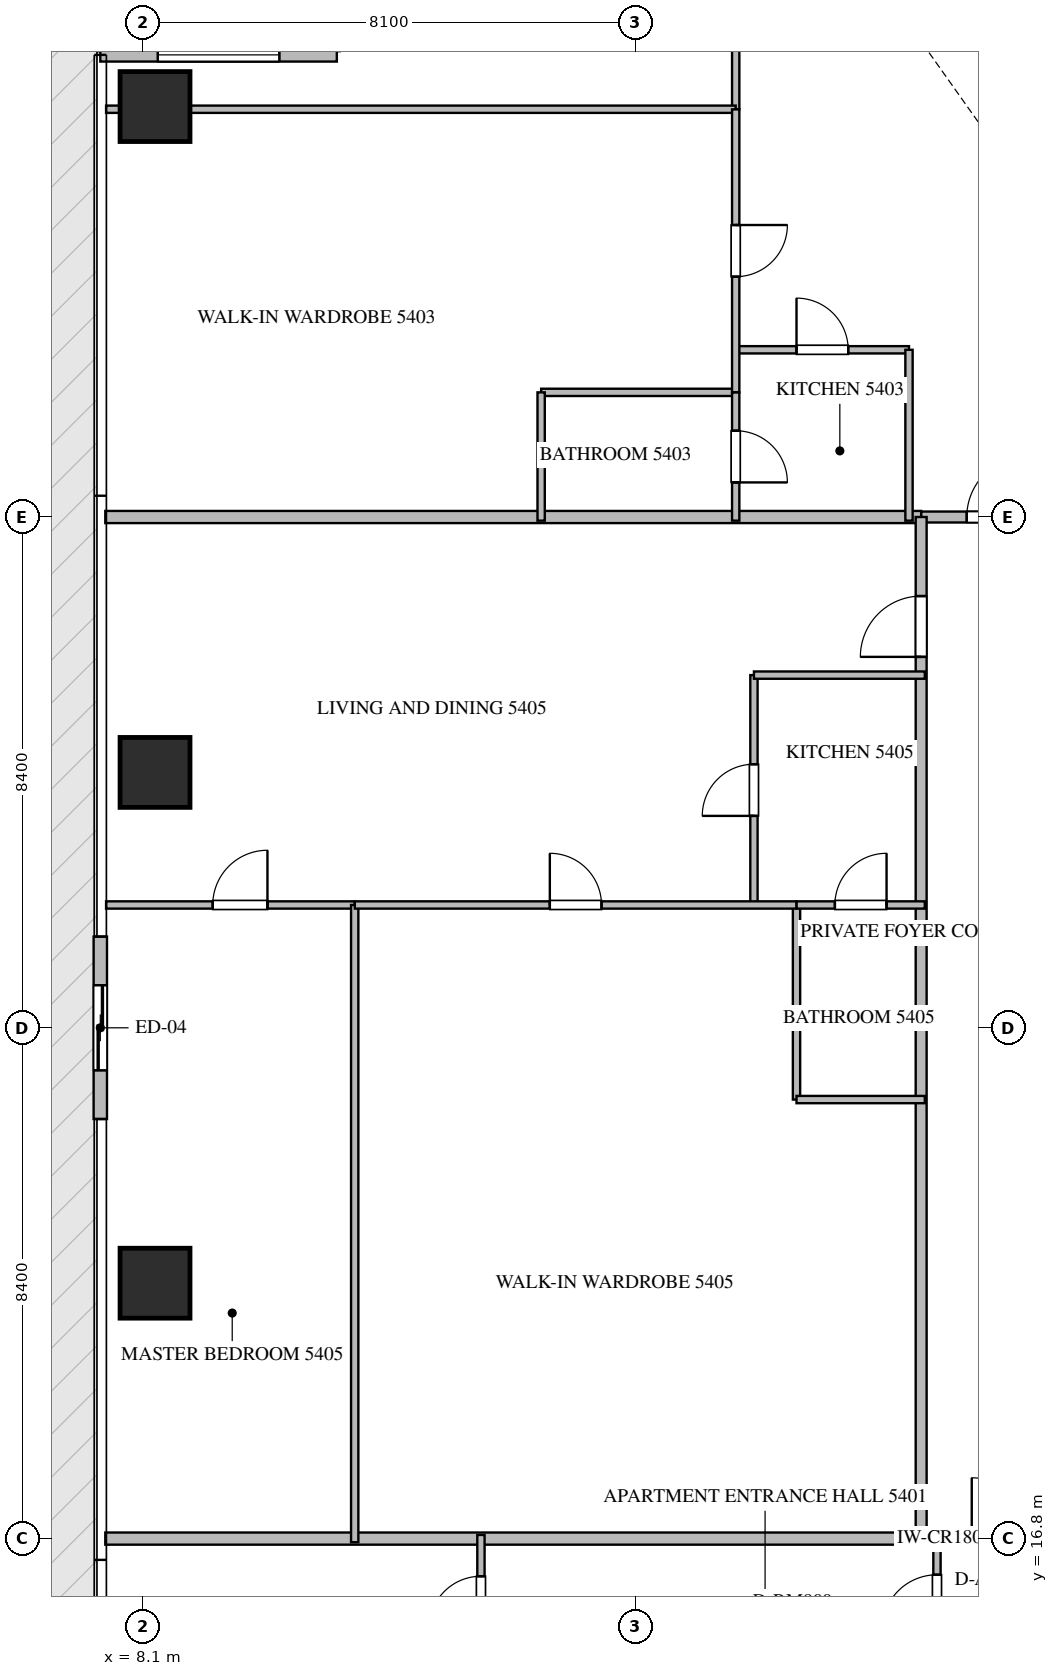
"""IFC4 building model, lengths in metres.
Left out: names, types, materials, properties, quantities, classifications, styles, units other than length and angle.
Written with IfcOpenShell. Run it as: python <this file> out.ifc"""

import sys

from ifc_helpers import new_model, si_unit, direction, frame, frame_2d, origin, origin_2d, place, context, subcontext, project, spatial, rectangle, extrude, source, transform, mapped, element, fill, save


model = new_model("IFC4")
c1 = context("Model", 3, precision=1e-05, world=origin(), true_north=direction((0.0, 1.0)))
c2 = subcontext(c1, "Body", "Model", "MODEL_VIEW")
j1 = project(units=[si_unit("LENGTHUNIT", "METRE"), si_unit("PLANEANGLEUNIT", "RADIAN")], contexts=[c1])
p1 = place(None, origin())
s1 = spatial("IfcSite", under=j1, at=p1, CompositionType="ELEMENT")
p2 = place(p1, origin())
s2 = spatial("IfcBuilding", under=s1, at=p2, CompositionType="ELEMENT")
p3 = place(p2, frame((0.0, 0.0, 218.15)))
s3 = spatial("IfcBuildingStorey", under=s2, at=p3, CompositionType="ELEMENT", Elevation=218.15)
m1 = source(origin(), c2, "Body", "SweptSolid", [
    extrude(rectangle(XDim=1.15, YDim=1.15, at=origin_2d()), origin(), (0.0, 0.0, 1.0), 3.85),
])
for number, where, z_axis, x_axis in (
    (1, (8.3, 21.0, -0.26), (0.0, 0.0, 1.0), (1.0, 0.0, 0.0)),
    (2, (8.3, 29.4, -0.26), (0.0, 0.0, 1.0), (1.0, 0.0, 0.0)),
    (3, (8.3, 40.35, -0.26), (0.0, 0.0, 1.0), (1.0, 0.0, 0.0)),
):
    element("IfcColumn", number, at=place(p3, frame(where, z_axis=z_axis, x_axis=x_axis)), inside=s3, PredefinedType="COLUMN", context=c2, shape_type="MappedRepresentation", body=[
        mapped(m1, transform((0.0, 0.0, 0.0), scale=1.0)),
    ])
p4 = place(p3, frame((11.29, 41.2, 0.0), z_axis=(0.0, 0.0, 1.0), x_axis=(-1.0, 0.0, 0.0)))
e4 = element("IfcWall", 4, at=p4, inside=s3, PredefinedType="ELEMENTEDWALL", context=c2, shape_type="SweptSolid", body=[
    extrude(rectangle(XDim=3.89, YDim=0.22, at=frame_2d((1.945, 0.0))), origin(), (0.0, 0.0, 1.0), 3.575),
])
p5 = place(p4, frame((0.945, 0.0, 0.65)))
e5 = element("IfcOpeningElement", 5, at=p5, cuts=e4, PredefinedType="OPENING", context=c2, shape_type="SweptSolid", body=[
    extrude(rectangle(XDim=2.0, YDim=2.2, at=frame_2d((1.0, 1.1))), frame((0.0, 0.12, 0.0), z_axis=(0.0, -1.0, 0.0), x_axis=(1.0, 0.0, 0.0)), (0.0, 0.0, 1.0), 0.24),
])
p6 = place(p3, frame((7.4, 26.7, 0.0), z_axis=(0.0, 0.0, 1.0), x_axis=(0.0, -1.0, 0.0)))
e6 = element("IfcWall", 6, at=p6, inside=s3, PredefinedType="ELEMENTEDWALL", context=c2, shape_type="SweptSolid", body=[
    extrude(rectangle(XDim=3.0, YDim=0.22, at=frame_2d((1.5, 0.0))), origin(), (0.0, 0.0, 1.0), 3.575),
])
p7 = place(p6, frame((0.8, 0.0, 0.0)))
e7 = element("IfcOpeningElement", 7, at=p7, cuts=e6, PredefinedType="OPENING", context=c2, shape_type="SweptSolid", body=[
    extrude(rectangle(XDim=1.4, YDim=2.25, at=frame_2d((0.7, 1.125))), frame((0.0, 0.12, 0.0), z_axis=(0.0, -1.0, 0.0), x_axis=(1.0, 0.0, 0.0)), (0.0, 0.0, 1.0), 0.24),
])
for number, where, z_axis, x_axis in (
    (8, (7.482, 16.8, 0.0), (0.0, 0.0, 1.0), (1.0, 0.0, 0.0)),
    (9, (7.482, 33.6, 0.0), (0.0, 0.0, 1.0), (1.0, 0.0, 0.0)),
):
    element("IfcWall", number, at=place(p3, frame(where, z_axis=z_axis, x_axis=x_axis)), inside=s3, PredefinedType="PARTITIONING", context=c2, shape_type="SweptSolid", body=[
        extrude(rectangle(XDim=13.418, YDim=0.2, at=frame_2d((6.709, 0.0))), origin(), (0.0, 0.0, 1.0), 3.59),
    ])
p8 = place(p3, frame((20.902, 16.8, 0.0), z_axis=(0.0, 0.0, 1.0), x_axis=(1.0, 0.0, 0.0)))
e10 = element("IfcWall", 10, at=p8, inside=s3, PredefinedType="PARTITIONING", context=c2, shape_type="SweptSolid", body=[
    extrude(rectangle(XDim=2.496, YDim=0.18, at=frame_2d((1.248, 0.0))), origin(), (0.0, 0.0, 1.0), 3.59),
])
p9 = place(p8, frame((0.83, 0.0, 0.0)))
e11 = element("IfcOpeningElement", 11, at=p9, cuts=e10, PredefinedType="OPENING", context=c2, shape_type="SweptSolid", body=[
    extrude(rectangle(XDim=1.0, YDim=2.15, at=frame_2d((0.5, 1.075))), frame((0.0, 0.1, 0.0), z_axis=(0.0, -1.0, 0.0), x_axis=(1.0, 0.0, 0.0)), (0.0, 0.0, 1.0), 0.2),
])
p10 = place(p3, frame((20.902, 33.6, 0.0), z_axis=(0.0, 0.0, 1.0), x_axis=(1.0, 0.0, 0.0)))
e12 = element("IfcWall", 12, at=p10, inside=s3, PredefinedType="PARTITIONING", context=c2, shape_type="SweptSolid", body=[
    extrude(rectangle(XDim=2.496, YDim=0.18, at=frame_2d((1.248, 0.0))), origin(), (0.0, 0.0, 1.0), 3.59),
])
p11 = place(p10, frame((0.748, 0.0, 0.0)))
e13 = element("IfcOpeningElement", 13, at=p11, cuts=e12, PredefinedType="OPENING", context=c2, shape_type="SweptSolid", body=[
    extrude(rectangle(XDim=1.0, YDim=2.15, at=frame_2d((0.5, 1.075))), frame((0.0, 0.1, 0.0), z_axis=(0.0, -1.0, 0.0), x_axis=(1.0, 0.0, 0.0)), (0.0, 0.0, 1.0), 0.2),
])
p12 = place(p3, frame((20.9, 16.8, 0.0), z_axis=(0.0, 0.0, 1.0), x_axis=(0.0, 1.0, 0.0)))
e14 = element("IfcWall", 14, at=p12, inside=s3, PredefinedType="PARTITIONING", context=c2, shape_type="SweptSolid", body=[
    extrude(rectangle(XDim=16.8, YDim=0.18, at=frame_2d((8.4, 0.0))), origin(), (0.0, 0.0, 1.0), 3.59),
])
p13 = place(p12, frame((14.5, 0.0, 0.0)))
e15 = element("IfcOpeningElement", 15, at=p13, cuts=e14, PredefinedType="OPENING", context=c2, shape_type="SweptSolid", body=[
    extrude(rectangle(XDim=1.0, YDim=2.15, at=frame_2d((0.5, 1.075))), frame((0.0, 0.1, 0.0), z_axis=(0.0, -1.0, 0.0), x_axis=(1.0, 0.0, 0.0)), (0.0, 0.0, 1.0), 0.2),
])
p14 = place(p3, frame((21.16, 14.65, 0.0), z_axis=(0.0, 0.0, 1.0), x_axis=(0.0, 1.0, 0.0)))
e16 = element("IfcWall", 16, at=p14, inside=s3, PredefinedType="PARTITIONING", context=c2, shape_type="SweptSolid", body=[
    extrude(rectangle(XDim=2.21, YDim=0.12, at=frame_2d((1.105, 0.0))), origin(), (0.0, 0.0, 1.0), 3.59),
])
p15 = place(p14, frame((0.655, 0.0, 0.0)))
e17 = element("IfcOpeningElement", 17, at=p15, cuts=e16, PredefinedType="OPENING", context=c2, shape_type="SweptSolid", body=[
    extrude(rectangle(XDim=0.9, YDim=2.1, at=frame_2d((0.45, 1.05))), frame((0.0, 0.07, 0.0), z_axis=(0.0, -1.0, 0.0), x_axis=(1.0, 0.0, 0.0)), (0.0, 0.0, 1.0), 0.14),
])
p16 = place(p3, frame((13.66, 14.652, 0.0), z_axis=(0.0, 0.0, 1.0), x_axis=(0.0, 1.0, 0.0)))
e18 = element("IfcWall", 18, at=p16, inside=s3, PredefinedType="PARTITIONING", context=c2, shape_type="SweptSolid", body=[
    extrude(rectangle(XDim=2.208, YDim=0.12, at=frame_2d((1.104, 0.0))), origin(), (0.0, 0.0, 1.0), 3.59),
])
p17 = place(p16, frame((0.679, 0.0, 0.0)))
e19 = element("IfcOpeningElement", 19, at=p17, cuts=e18, PredefinedType="OPENING", context=c2, shape_type="SweptSolid", body=[
    extrude(rectangle(XDim=0.85, YDim=2.1, at=frame_2d((0.425, 1.05))), frame((0.0, 0.07, 0.0), z_axis=(0.0, -1.0, 0.0), x_axis=(1.0, 0.0, 0.0)), (0.0, 0.0, 1.0), 0.14),
])
p18 = place(p3, frame((17.85, 36.35, 0.0), z_axis=(0.0, 0.0, 1.0), x_axis=(1.0, 0.0, 0.0)))
e20 = element("IfcWall", 20, at=p18, inside=s3, PredefinedType="PARTITIONING", context=c2, shape_type="SweptSolid", body=[
    extrude(rectangle(XDim=2.85, YDim=0.12, at=frame_2d((1.425, 0.0))), origin(), (0.0, 0.0, 1.0), 3.59),
])
p19 = place(p18, frame((1.0, 0.0, 0.0)))
e21 = element("IfcOpeningElement", 21, at=p19, cuts=e20, PredefinedType="OPENING", context=c2, shape_type="SweptSolid", body=[
    extrude(rectangle(XDim=0.85, YDim=2.1, at=frame_2d((0.425, 1.05))), frame((0.0, 0.07, 0.0), z_axis=(0.0, -1.0, 0.0), x_axis=(1.0, 0.0, 0.0)), (0.0, 0.0, 1.0), 0.14),
])
p20 = place(p3, frame((20.7, 36.35, 0.0), z_axis=(0.0, 0.0, 1.0), x_axis=(0.0, -1.0, 0.0)))
e22 = element("IfcWall", 22, at=p20, inside=s3, PredefinedType="PARTITIONING", context=c2, shape_type="SweptSolid", body=[
    extrude(rectangle(XDim=2.81, YDim=0.12, at=frame_2d((1.405, 0.0))), origin(), (0.0, 0.0, 1.0), 3.59),
])
p21 = place(p3, frame((17.85, 49.105, 0.0), z_axis=(0.0, 0.0, 1.0), x_axis=(0.0, -1.0, 0.0)))
e23 = element("IfcWall", 23, at=p21, inside=s3, PredefinedType="PARTITIONING", context=c2, shape_type="SweptSolid", body=[
    extrude(rectangle(XDim=8.799, YDim=0.12, at=frame_2d((4.399, 0.0))), origin(), (0.0, 0.0, 1.0), 3.59),
])
p22 = place(p21, frame((4.344, 0.0, 0.0)))
e24 = element("IfcOpeningElement", 24, at=p22, cuts=e23, PredefinedType="OPENING", context=c2, shape_type="SweptSolid", body=[
    extrude(rectangle(XDim=0.9, YDim=2.1, at=frame_2d((0.45, 1.05))), frame((0.0, 0.07, 0.0), z_axis=(0.0, -1.0, 0.0), x_axis=(1.0, 0.0, 0.0)), (0.0, 0.0, 1.0), 0.14),
])
p23 = place(p3, frame((7.495, 40.306, 0.0), z_axis=(0.0, 0.0, 1.0), x_axis=(1.0, 0.0, 0.0)))
e25 = element("IfcWall", 25, at=p23, inside=s3, PredefinedType="PARTITIONING", context=c2, shape_type="SweptSolid", body=[
    extrude(rectangle(XDim=10.355, YDim=0.12, at=frame_2d((5.177, 0.0))), origin(), (0.0, 0.0, 1.0), 3.122),
])
p24 = place(p3, frame((14.65, 35.65, 0.0), z_axis=(0.0, 0.0, 1.0), x_axis=(1.0, 0.0, 0.0)))
e26 = element("IfcWall", 26, at=p24, inside=s3, PredefinedType="PARTITIONING", context=c2, shape_type="SweptSolid", body=[
    extrude(rectangle(XDim=3.2, YDim=0.12, at=frame_2d((1.6, 0.0))), origin(), (0.0, 0.0, 1.0), 3.59),
])
p25 = place(p3, frame((14.65, 35.65, 0.0), z_axis=(0.0, 0.0, 1.0), x_axis=(0.0, -1.0, 0.0)))
e27 = element("IfcWall", 27, at=p25, inside=s3, PredefinedType="PARTITIONING", context=c2, shape_type="SweptSolid", body=[
    extrude(rectangle(XDim=2.11, YDim=0.12, at=frame_2d((1.055, 0.0))), origin(), (0.0, 0.0, 1.0), 3.59),
])
p26 = place(p3, frame((17.85, 40.304, 0.0), z_axis=(0.0, 0.0, 1.0), x_axis=(0.0, -1.0, 0.0)))
e28 = element("IfcWall", 28, at=p26, inside=s3, PredefinedType="PARTITIONING", context=c2, shape_type="SweptSolid", body=[
    extrude(rectangle(XDim=4.654, YDim=0.12, at=frame_2d((2.327, 0.0))), origin(), (0.0, 0.0, 1.0), 3.59),
])
p27 = place(p26, frame((1.902, 0.0, 0.0)))
e29 = element("IfcOpeningElement", 29, at=p27, cuts=e28, PredefinedType="OPENING", context=c2, shape_type="SweptSolid", body=[
    extrude(rectangle(XDim=0.85, YDim=2.1, at=frame_2d((0.425, 1.05))), frame((0.0, 0.07, 0.0), z_axis=(0.0, -1.0, 0.0), x_axis=(1.0, 0.0, 0.0)), (0.0, 0.0, 1.0), 0.14),
])
p28 = place(p3, frame((17.85, 35.648, 0.0), z_axis=(0.0, 0.0, 1.0), x_axis=(0.0, -1.0, 0.0)))
e30 = element("IfcWall", 30, at=p28, inside=s3, PredefinedType="PARTITIONING", context=c2, shape_type="SweptSolid", body=[
    extrude(rectangle(XDim=2.108, YDim=0.12, at=frame_2d((1.054, 0.0))), origin(), (0.0, 0.0, 1.0), 3.59),
])
p29 = place(p28, frame((0.629, 0.0, 0.0)))
e31 = element("IfcOpeningElement", 31, at=p29, cuts=e30, PredefinedType="OPENING", context=c2, shape_type="SweptSolid", body=[
    extrude(rectangle(XDim=0.85, YDim=2.1, at=frame_2d((0.425, 1.05))), frame((0.0, 0.07, 0.0), z_axis=(0.0, -1.0, 0.0), x_axis=(1.0, 0.0, 0.0)), (0.0, 0.0, 1.0), 0.14),
])
p30 = place(p3, frame((18.15, 27.22, 0.0), z_axis=(0.0, 0.0, 1.0), x_axis=(0.0, 1.0, 0.0)))
e32 = element("IfcWall", 32, at=p30, inside=s3, PredefinedType="PARTITIONING", context=c2, shape_type="SweptSolid", body=[
    extrude(rectangle(XDim=3.78, YDim=0.12, at=frame_2d((1.89, 0.0))), origin(), (0.0, 0.0, 1.0), 3.59),
])
p31 = place(p30, frame((1.465, 0.0, 0.0)))
e33 = element("IfcOpeningElement", 33, at=p31, cuts=e32, PredefinedType="OPENING", context=c2, shape_type="SweptSolid", body=[
    extrude(rectangle(XDim=0.85, YDim=2.1, at=frame_2d((0.425, 1.05))), frame((0.0, 0.07, 0.0), z_axis=(0.0, -1.0, 0.0), x_axis=(1.0, 0.0, 0.0)), (0.0, 0.0, 1.0), 0.14),
])
p32 = place(p3, frame((18.15, 31.0, 0.0), z_axis=(0.0, 0.0, 1.0), x_axis=(1.0, 0.0, 0.0)))
e34 = element("IfcWall", 34, at=p32, inside=s3, PredefinedType="PARTITIONING", context=c2, shape_type="SweptSolid", body=[
    extrude(rectangle(XDim=2.81, YDim=0.12, at=frame_2d((1.405, 0.0))), origin(), (0.0, 0.0, 1.0), 3.59),
])
p33 = place(p3, frame((7.495, 27.22, 0.0), z_axis=(0.0, 0.0, 1.0), x_axis=(1.0, 0.0, 0.0)))
e35 = element("IfcWall", 35, at=p33, inside=s3, PredefinedType="PARTITIONING", context=c2, shape_type="SweptSolid", body=[
    extrude(rectangle(XDim=4.089, YDim=0.12, at=frame_2d((2.044, 0.0))), origin(), (0.0, 0.0, 1.0), 3.59),
])
p34 = place(p33, frame((1.754, 0.0, 0.0)))
e36 = element("IfcOpeningElement", 36, at=p34, cuts=e35, PredefinedType="OPENING", context=c2, shape_type="SweptSolid", body=[
    extrude(rectangle(XDim=0.9, YDim=2.1, at=frame_2d((0.45, 1.05))), frame((0.0, 0.07, 0.0), z_axis=(0.0, -1.0, 0.0), x_axis=(1.0, 0.0, 0.0)), (0.0, 0.0, 1.0), 0.14),
])
p35 = place(p3, frame((11.584, 16.74, 0.0), z_axis=(0.0, 0.0, 1.0), x_axis=(0.0, 1.0, 0.0)))
e37 = element("IfcWall", 37, at=p35, inside=s3, PredefinedType="PARTITIONING", context=c2, shape_type="SweptSolid", body=[
    extrude(rectangle(XDim=10.48, YDim=0.12, at=frame_2d((5.24, 0.0))), origin(), (0.0, 0.0, 1.0), 3.59),
])
p36 = place(p3, frame((18.85, 24.02, 0.0), z_axis=(0.0, 0.0, 1.0), x_axis=(0.0, 1.0, 0.0)))
e38 = element("IfcWall", 38, at=p36, inside=s3, PredefinedType="PARTITIONING", context=c2, shape_type="SweptSolid", body=[
    extrude(rectangle(XDim=3.2, YDim=0.12, at=frame_2d((1.6, 0.0))), origin(), (0.0, 0.0, 1.0), 3.59),
])
p37 = place(p3, frame((18.85, 24.02, 0.0), z_axis=(0.0, 0.0, 1.0), x_axis=(1.0, 0.0, 0.0)))
e39 = element("IfcWall", 39, at=p37, inside=s3, PredefinedType="PARTITIONING", context=c2, shape_type="SweptSolid", body=[
    extrude(rectangle(XDim=2.11, YDim=0.12, at=frame_2d((1.055, 0.0))), origin(), (0.0, 0.0, 1.0), 3.59),
])
p38 = place(p3, frame((11.586, 27.22, 0.0), z_axis=(0.0, 0.0, 1.0), x_axis=(1.0, 0.0, 0.0)))
e40 = element("IfcWall", 40, at=p38, inside=s3, PredefinedType="PARTITIONING", context=c2, shape_type="SweptSolid", body=[
    extrude(rectangle(XDim=7.264, YDim=0.12, at=frame_2d((3.632, 0.0))), origin(), (0.0, 0.0, 1.0), 3.59),
])
p39 = place(p38, frame((3.207, 0.0, 0.0)))
e41 = element("IfcOpeningElement", 41, at=p39, cuts=e40, PredefinedType="OPENING", context=c2, shape_type="SweptSolid", body=[
    extrude(rectangle(XDim=0.85, YDim=2.1, at=frame_2d((0.425, 1.05))), frame((0.0, 0.07, 0.0), z_axis=(0.0, -1.0, 0.0), x_axis=(1.0, 0.0, 0.0)), (0.0, 0.0, 1.0), 0.14),
])
p40 = place(p3, frame((18.852, 27.22, 0.0), z_axis=(0.0, 0.0, 1.0), x_axis=(1.0, 0.0, 0.0)))
e42 = element("IfcWall", 42, at=p40, inside=s3, PredefinedType="PARTITIONING", context=c2, shape_type="SweptSolid", body=[
    extrude(rectangle(XDim=2.108, YDim=0.12, at=frame_2d((1.054, 0.0))), origin(), (0.0, 0.0, 1.0), 3.59),
])
p41 = place(p40, frame((0.629, 0.0, 0.0)))
e43 = element("IfcOpeningElement", 43, at=p41, cuts=e42, PredefinedType="OPENING", context=c2, shape_type="SweptSolid", body=[
    extrude(rectangle(XDim=0.85, YDim=2.1, at=frame_2d((0.425, 1.05))), frame((0.0, 0.07, 0.0), z_axis=(0.0, -1.0, 0.0), x_axis=(1.0, 0.0, 0.0)), (0.0, 0.0, 1.0), 0.14),
])
m2 = source(origin(), c2, "Body", "SweptSolid", [
    extrude(rectangle(XDim=2.0, YDim=2.2, at=frame_2d((1.0, 1.1))), frame((0.0, 0.03, 0.0), z_axis=(0.0, -1.0, 0.0), x_axis=(1.0, 0.0, 0.0)), (0.0, 0.0, 1.0), 0.06),
])
p42 = place(p5, origin())
e44 = element("IfcWindow", 44, at=p42, inside=s3, PartitioningType="SINGLE_PANEL", PredefinedType="WINDOW", context=c2, shape_type="MappedRepresentation", body=[
    mapped(m2, transform((0.0, 0.0, 0.0), scale=1.0)),
])
fill(e5, e44)
m3 = source(origin(), c2, "Body", "SweptSolid", [
    extrude(rectangle(XDim=1.4, YDim=2.25, at=frame_2d((0.7, 1.125))), frame((0.0, 0.025, 0.0), z_axis=(0.0, -1.0, 0.0), x_axis=(1.0, 0.0, 0.0)), (0.0, 0.0, 1.0), 0.05),
])
p43 = place(p7, origin())
e45 = element("IfcDoor", 45, at=p43, inside=s3, OperationType="SLIDING_TO_LEFT", PredefinedType="DOOR", context=c2, shape_type="MappedRepresentation", body=[
    mapped(m3, transform((0.0, 0.0, 0.0), scale=1.0)),
])
fill(e7, e45)
m4 = source(origin(), c2, "Body", "SweptSolid", [
    extrude(rectangle(XDim=1.0, YDim=2.15, at=frame_2d((0.5, 1.075))), frame((0.0, 0.025, 0.0), z_axis=(0.0, -1.0, 0.0), x_axis=(1.0, 0.0, 0.0)), (0.0, 0.0, 1.0), 0.05),
])
p44 = place(p9, origin())
e46 = element("IfcDoor", 46, at=p44, inside=s3, OperationType="SINGLE_SWING_LEFT", PredefinedType="DOOR", context=c2, shape_type="MappedRepresentation", body=[
    mapped(m4, transform((0.0, 0.0, 0.0), scale=1.0)),
])
fill(e11, e46)
p45 = place(p11, origin())
e47 = element("IfcDoor", 47, at=p45, inside=s3, OperationType="SINGLE_SWING_RIGHT", PredefinedType="DOOR", context=c2, shape_type="MappedRepresentation", body=[
    mapped(m4, transform((0.0, 0.0, 0.0), scale=1.0)),
])
fill(e13, e47)
p46 = place(p13, origin())
e48 = element("IfcDoor", 48, at=p46, inside=s3, OperationType="SINGLE_SWING_LEFT", PredefinedType="DOOR", context=c2, shape_type="MappedRepresentation", body=[
    mapped(m4, transform((0.0, 0.0, 0.0), scale=1.0)),
])
fill(e15, e48)
m5 = source(origin(), c2, "Body", "SweptSolid", [
    extrude(rectangle(XDim=0.9, YDim=2.1, at=frame_2d((0.45, 1.05))), frame((0.0, 0.025, 0.0), z_axis=(0.0, -1.0, 0.0), x_axis=(1.0, 0.0, 0.0)), (0.0, 0.0, 1.0), 0.05),
])
p47 = place(p15, origin())
e49 = element("IfcDoor", 49, at=p47, inside=s3, OperationType="SINGLE_SWING_LEFT", PredefinedType="DOOR", context=c2, shape_type="MappedRepresentation", body=[
    mapped(m5, transform((0.0, 0.0, 0.0), scale=1.0)),
])
fill(e17, e49)
m6 = source(origin(), c2, "Body", "SweptSolid", [
    extrude(rectangle(XDim=0.85, YDim=2.1, at=frame_2d((0.425, 1.05))), frame((0.0, 0.025, 0.0), z_axis=(0.0, -1.0, 0.0), x_axis=(1.0, 0.0, 0.0)), (0.0, 0.0, 1.0), 0.05),
])
p48 = place(p17, origin())
e50 = element("IfcDoor", 50, at=p48, inside=s3, OperationType="SINGLE_SWING_LEFT", PredefinedType="DOOR", context=c2, shape_type="MappedRepresentation", body=[
    mapped(m6, transform((0.0, 0.0, 0.0), scale=1.0)),
])
fill(e19, e50)
p49 = place(p19, origin())
e51 = element("IfcDoor", 51, at=p49, inside=s3, OperationType="SINGLE_SWING_LEFT", PredefinedType="DOOR", context=c2, shape_type="MappedRepresentation", body=[
    mapped(m6, transform((0.0, 0.0, 0.0), scale=1.0)),
])
fill(e21, e51)
p50 = place(p27, origin())
e52 = element("IfcDoor", 52, at=p50, inside=s3, OperationType="SINGLE_SWING_LEFT", PredefinedType="DOOR", context=c2, shape_type="MappedRepresentation", body=[
    mapped(m6, transform((0.0, 0.0, 0.0), scale=1.0)),
])
fill(e29, e52)
p51 = place(p29, origin())
e53 = element("IfcDoor", 53, at=p51, inside=s3, OperationType="SINGLE_SWING_RIGHT", PredefinedType="DOOR", context=c2, shape_type="MappedRepresentation", body=[
    mapped(m6, transform((0.0, 0.0, 0.0), scale=1.0)),
])
fill(e31, e53)
p52 = place(p31, origin())
e54 = element("IfcDoor", 54, at=p52, inside=s3, OperationType="SINGLE_SWING_LEFT", PredefinedType="DOOR", context=c2, shape_type="MappedRepresentation", body=[
    mapped(m6, transform((0.0, 0.0, 0.0), scale=1.0)),
])
fill(e33, e54)
p53 = place(p34, origin())
e55 = element("IfcDoor", 55, at=p53, inside=s3, OperationType="SINGLE_SWING_RIGHT", PredefinedType="DOOR", context=c2, shape_type="MappedRepresentation", body=[
    mapped(m5, transform((0.0, 0.0, 0.0), scale=1.0)),
])
fill(e36, e55)
p54 = place(p39, origin())
e56 = element("IfcDoor", 56, at=p54, inside=s3, OperationType="SINGLE_SWING_LEFT", PredefinedType="DOOR", context=c2, shape_type="MappedRepresentation", body=[
    mapped(m6, transform((0.0, 0.0, 0.0), scale=1.0)),
])
fill(e41, e56)
p55 = place(p41, origin())
e57 = element("IfcDoor", 57, at=p55, inside=s3, OperationType="SINGLE_SWING_RIGHT", PredefinedType="DOOR", context=c2, shape_type="MappedRepresentation", body=[
    mapped(m6, transform((0.0, 0.0, 0.0), scale=1.0)),
])
fill(e43, e57)
save(model, sys.argv[1])
